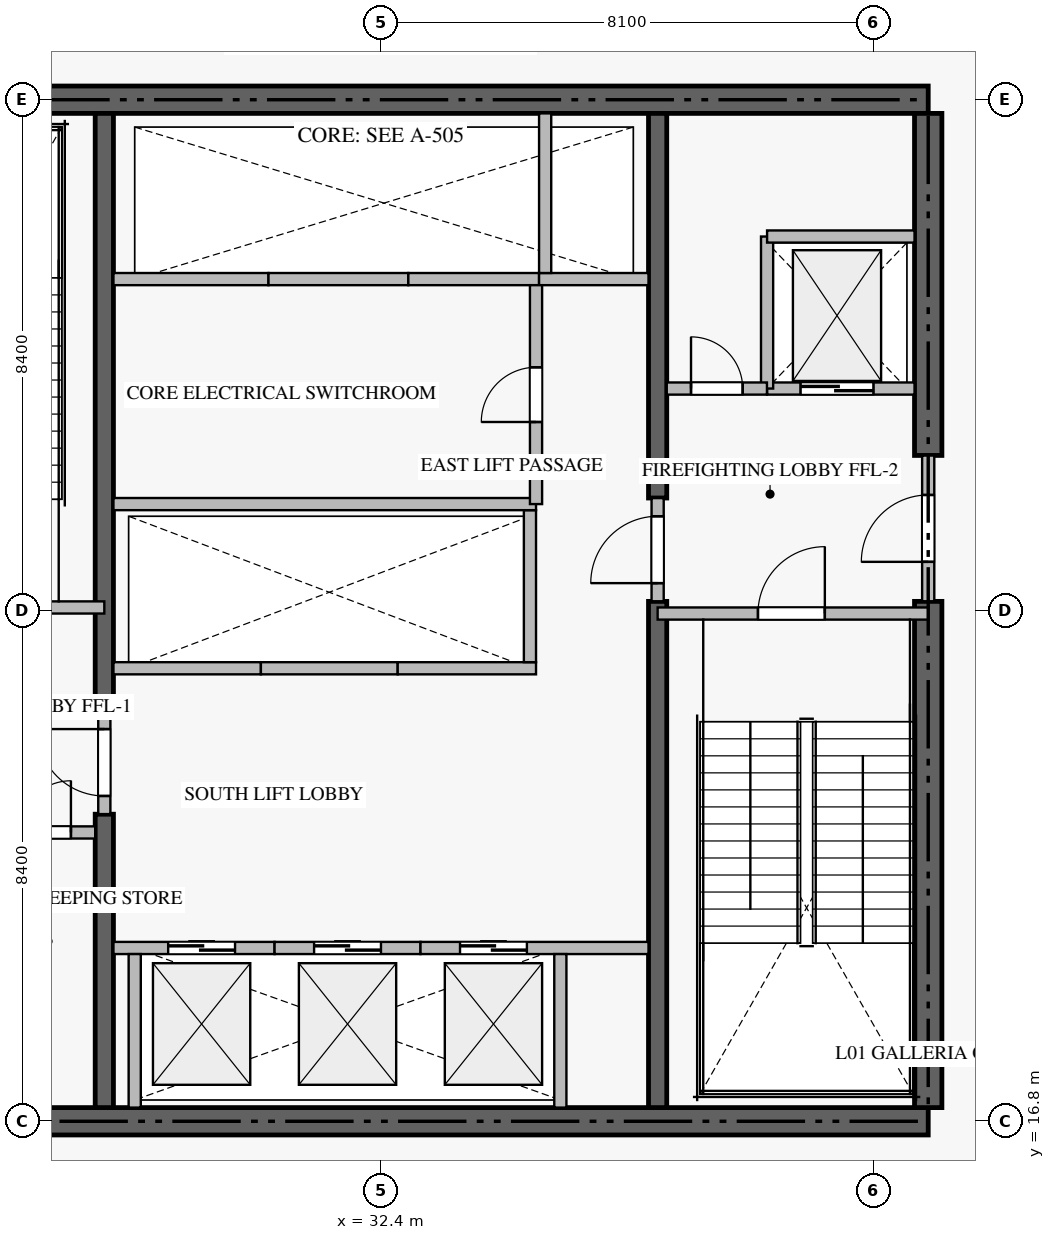
"""IFC4 building model, lengths in metres.
Left out: names, types, materials, properties, quantities, classifications, styles, units other than length and angle.
Written with IfcOpenShell. Run it as: python <this file> out.ifc"""

import sys

from ifc_helpers import new_model, si_unit, direction, frame, frame_2d, origin, place, context, subcontext, project, spatial, rectangle, extrude, source, transform, mapped, element, fill, save


model = new_model("IFC4")
c1 = context("Model", 3, precision=1e-05, world=origin(), true_north=direction((0.0, 1.0)))
c2 = subcontext(c1, "Body", "Model", "MODEL_VIEW")
j1 = project(units=[si_unit("LENGTHUNIT", "METRE"), si_unit("PLANEANGLEUNIT", "RADIAN")], contexts=[c1])
p1 = place(None, origin())
s1 = spatial("IfcSite", under=j1, at=p1, CompositionType="ELEMENT")
p2 = place(p1, origin())
s2 = spatial("IfcBuilding", under=s1, at=p2, CompositionType="ELEMENT")
p3 = place(p2, frame((0.0, 0.0, 5.5)))
s3 = spatial("IfcBuildingStorey", under=s2, at=p3, CompositionType="ELEMENT", Elevation=5.5)
for number, where, z_axis, x_axis in (
    (1, (23.4, 16.8, -0.38), (0.0, 0.0, 1.0), (1.0, 0.0, 0.0)),
    (2, (41.4, 33.6, -0.38), (0.0, 0.0, 1.0), (-1.0, 0.0, 0.0)),
):
    element("IfcWall", number, at=place(p3, frame(where, z_axis=z_axis, x_axis=x_axis)), inside=s3, PredefinedType="SHEAR", context=c2, shape_type="SweptSolid", body=[
        extrude(rectangle(XDim=18.0, YDim=0.45, at=frame_2d((9.0, 0.0))), origin(), (0.0, 0.0, 1.0), 4.998),
    ])
p4 = place(p3, frame((41.4, 17.025, -0.38), z_axis=(0.0, 0.0, 1.0), x_axis=(0.0, 1.0, 0.0)))
e3 = element("IfcWall", 3, at=p4, inside=s3, PredefinedType="SHEAR", context=c2, shape_type="SweptSolid", body=[
    extrude(rectangle(XDim=8.325, YDim=0.45, at=frame_2d((4.163, 0.0))), origin(), (0.0, 0.0, 1.0), 4.998),
])
p5 = place(p3, frame((41.4, 27.75, -0.38), z_axis=(0.0, 0.0, 1.0), x_axis=(0.0, 1.0, 0.0)))
e4 = element("IfcWall", 4, at=p5, inside=s3, PredefinedType="SHEAR", context=c2, shape_type="SweptSolid", body=[
    extrude(rectangle(XDim=5.625, YDim=0.45, at=frame_2d((2.812, 0.0))), origin(), (0.0, 0.0, 1.0), 4.998),
])
p6 = place(p3, frame((27.85, 17.025, -0.38), z_axis=(0.0, 0.0, 1.0), x_axis=(0.0, 1.0, 0.0)))
e5 = element("IfcWall", 5, at=p6, inside=s3, PredefinedType="SHEAR", context=c2, shape_type="SweptSolid", body=[
    extrude(rectangle(XDim=4.825, YDim=0.3, at=frame_2d((2.413, 0.0))), origin(), (0.0, 0.0, 1.0), 4.998),
])
p7 = place(p3, frame((27.85, 23.55, -0.38), z_axis=(0.0, 0.0, 1.0), x_axis=(0.0, 1.0, 0.0)))
e6 = element("IfcWall", 6, at=p7, inside=s3, PredefinedType="SHEAR", context=c2, shape_type="SweptSolid", body=[
    extrude(rectangle(XDim=9.825, YDim=0.3, at=frame_2d((4.913, 0.0))), origin(), (0.0, 0.0, 1.0), 4.998),
])
p8 = place(p3, frame((36.95, 17.025, -0.38), z_axis=(0.0, 0.0, 1.0), x_axis=(0.0, 1.0, 0.0)))
e7 = element("IfcWall", 7, at=p8, inside=s3, PredefinedType="SHEAR", context=c2, shape_type="SweptSolid", body=[
    extrude(rectangle(XDim=8.325, YDim=0.3, at=frame_2d((4.163, 0.0))), origin(), (0.0, 0.0, 1.0), 4.998),
])
p9 = place(p3, frame((36.95, 27.05, -0.38), z_axis=(0.0, 0.0, 1.0), x_axis=(0.0, 1.0, 0.0)))
e8 = element("IfcWall", 8, at=p9, inside=s3, PredefinedType="SHEAR", context=c2, shape_type="SweptSolid", body=[
    extrude(rectangle(XDim=6.325, YDim=0.3, at=frame_2d((3.163, 0.0))), origin(), (0.0, 0.0, 1.0), 4.998),
])
p10 = place(p3, frame((23.4, 25.25, 0.0), z_axis=(0.0, 0.0, 1.0), x_axis=(1.0, 0.0, 0.0)))
e9 = element("IfcWall", 9, at=p10, inside=s3, PredefinedType="STANDARD", context=c2, shape_type="SweptSolid", body=[
    extrude(rectangle(XDim=4.45, YDim=0.2, at=frame_2d((2.225, 0.0))), origin(), (0.0, 0.0, 1.0), 4.62),
])
p11 = place(p10, frame((1.65, 0.0, 0.0)))
e10 = element("IfcOpeningElement", 10, at=p11, cuts=e9, PredefinedType="OPENING", context=c2, shape_type="SweptSolid", body=[
    extrude(rectangle(XDim=1.1, YDim=2.15, at=frame_2d((0.55, 1.075))), frame((0.0, 0.11, 0.0), z_axis=(0.0, -1.0, 0.0), x_axis=(1.0, 0.0, 0.0)), (0.0, 0.0, 1.0), 0.22),
])
p12 = place(p3, frame((36.95, 25.15, 0.0), z_axis=(0.0, 0.0, 1.0), x_axis=(1.0, 0.0, 0.0)))
e11 = element("IfcWall", 11, at=p12, inside=s3, PredefinedType="STANDARD", context=c2, shape_type="SweptSolid", body=[
    extrude(rectangle(XDim=4.45, YDim=0.2, at=frame_2d((2.225, 0.0))), origin(), (0.0, 0.0, 1.0), 4.62),
])
p13 = place(p12, frame((1.65, 0.0, 0.0)))
e12 = element("IfcOpeningElement", 12, at=p13, cuts=e11, PredefinedType="OPENING", context=c2, shape_type="SweptSolid", body=[
    extrude(rectangle(XDim=1.1, YDim=2.15, at=frame_2d((0.55, 1.075))), frame((0.0, 0.11, 0.0), z_axis=(0.0, -1.0, 0.0), x_axis=(1.0, 0.0, 0.0)), (0.0, 0.0, 1.0), 0.22),
])
p14 = place(p3, frame((38.75, 28.85, 0.0), z_axis=(0.0, 0.0, 1.0), x_axis=(1.0, 0.0, 0.0)))
e13 = element("IfcWall", 13, at=p14, inside=s3, PredefinedType="STANDARD", context=c2, shape_type="SweptSolid", body=[
    extrude(rectangle(XDim=2.425, YDim=0.2, at=frame_2d((1.212, 0.0))), origin(), (0.0, 0.0, 1.0), 4.62),
])
p15 = place(p14, frame((0.55, 0.0, 0.0)))
e14 = element("IfcOpeningElement", 14, at=p15, cuts=e13, PredefinedType="OPENING", context=c2, shape_type="SweptSolid", body=[
    extrude(rectangle(XDim=1.2, YDim=2.2, at=frame_2d((0.6, 1.1))), frame((0.0, 0.11, 0.0), z_axis=(0.0, -1.0, 0.0), x_axis=(1.0, 0.0, 0.0)), (0.0, 0.0, 1.0), 0.22),
])
p16 = place(p3, frame((28.0, 19.65, 0.0), z_axis=(0.0, 0.0, 1.0), x_axis=(1.0, 0.0, 0.0)))
e15 = element("IfcWall", 15, at=p16, inside=s3, PredefinedType="STANDARD", context=c2, shape_type="SweptSolid", body=[
    extrude(rectangle(XDim=2.65, YDim=0.2, at=frame_2d((1.325, 0.0))), origin(), (0.0, 0.0, 1.0), 4.62),
])
p17 = place(p16, frame((0.9, 0.0, 0.0)))
e16 = element("IfcOpeningElement", 16, at=p17, cuts=e15, PredefinedType="OPENING", context=c2, shape_type="SweptSolid", body=[
    extrude(rectangle(XDim=1.1, YDim=2.2, at=frame_2d((0.55, 1.1))), frame((0.0, 0.11, 0.0), z_axis=(0.0, -1.0, 0.0), x_axis=(1.0, 0.0, 0.0)), (0.0, 0.0, 1.0), 0.22),
])
p18 = place(p3, frame((28.35, 17.025, 0.0), z_axis=(0.0, 0.0, 1.0), x_axis=(0.0, 1.0, 0.0)))
e17 = element("IfcWall", 17, at=p18, inside=s3, PredefinedType="STANDARD", context=c2, shape_type="SweptSolid", body=[
    extrude(rectangle(XDim=2.525, YDim=0.2, at=frame_2d((1.263, 0.0))), origin(), (0.0, 0.0, 1.0), 4.62),
])
p19 = place(p3, frame((30.65, 19.65, 0.0), z_axis=(0.0, 0.0, 1.0), x_axis=(1.0, 0.0, 0.0)))
e18 = element("IfcWall", 18, at=p19, inside=s3, PredefinedType="STANDARD", context=c2, shape_type="SweptSolid", body=[
    extrude(rectangle(XDim=2.4, YDim=0.2, at=frame_2d((1.2, 0.0))), origin(), (0.0, 0.0, 1.0), 4.62),
])
p20 = place(p19, frame((0.65, 0.0, 0.0)))
e19 = element("IfcOpeningElement", 19, at=p20, cuts=e18, PredefinedType="OPENING", context=c2, shape_type="SweptSolid", body=[
    extrude(rectangle(XDim=1.1, YDim=2.2, at=frame_2d((0.55, 1.1))), frame((0.0, 0.11, 0.0), z_axis=(0.0, -1.0, 0.0), x_axis=(1.0, 0.0, 0.0)), (0.0, 0.0, 1.0), 0.22),
])
p21 = place(p3, frame((33.05, 19.65, 0.0), z_axis=(0.0, 0.0, 1.0), x_axis=(1.0, 0.0, 0.0)))
e20 = element("IfcWall", 20, at=p21, inside=s3, PredefinedType="STANDARD", context=c2, shape_type="SweptSolid", body=[
    extrude(rectangle(XDim=3.75, YDim=0.2, at=frame_2d((1.875, 0.0))), origin(), (0.0, 0.0, 1.0), 4.62),
])
p22 = place(p21, frame((0.65, 0.0, 0.0)))
e21 = element("IfcOpeningElement", 21, at=p22, cuts=e20, PredefinedType="OPENING", context=c2, shape_type="SweptSolid", body=[
    extrude(rectangle(XDim=1.1, YDim=2.2, at=frame_2d((0.55, 1.1))), frame((0.0, 0.11, 0.0), z_axis=(0.0, -1.0, 0.0), x_axis=(1.0, 0.0, 0.0)), (0.0, 0.0, 1.0), 0.22),
])
p23 = place(p3, frame((35.35, 17.025, 0.0), z_axis=(0.0, 0.0, 1.0), x_axis=(0.0, 1.0, 0.0)))
e22 = element("IfcWall", 22, at=p23, inside=s3, PredefinedType="STANDARD", context=c2, shape_type="SweptSolid", body=[
    extrude(rectangle(XDim=2.525, YDim=0.2, at=frame_2d((1.263, 0.0))), origin(), (0.0, 0.0, 1.0), 4.62),
])
p24 = place(p3, frame((28.0, 24.25, 0.0), z_axis=(0.0, 0.0, 1.0), x_axis=(1.0, 0.0, 0.0)))
e23 = element("IfcWall", 23, at=p24, inside=s3, PredefinedType="STANDARD", context=c2, shape_type="SweptSolid", body=[
    extrude(rectangle(XDim=2.425, YDim=0.2, at=frame_2d((1.212, 0.0))), origin(), (0.0, 0.0, 1.0), 4.62),
])
p25 = place(p3, frame((30.425, 24.25, 0.0), z_axis=(0.0, 0.0, 1.0), x_axis=(1.0, 0.0, 0.0)))
e24 = element("IfcWall", 24, at=p25, inside=s3, PredefinedType="STANDARD", context=c2, shape_type="SweptSolid", body=[
    extrude(rectangle(XDim=2.25, YDim=0.2, at=frame_2d((1.125, 0.0))), origin(), (0.0, 0.0, 1.0), 4.62),
])
p26 = place(p3, frame((32.675, 24.25, 0.0), z_axis=(0.0, 0.0, 1.0), x_axis=(1.0, 0.0, 0.0)))
e25 = element("IfcWall", 25, at=p26, inside=s3, PredefinedType="STANDARD", context=c2, shape_type="SweptSolid", body=[
    extrude(rectangle(XDim=2.275, YDim=0.2, at=frame_2d((1.137, 0.0))), origin(), (0.0, 0.0, 1.0), 4.62),
])
p27 = place(p3, frame((34.85, 24.35, 0.0), z_axis=(0.0, 0.0, 1.0), x_axis=(0.0, 1.0, 0.0)))
e26 = element("IfcWall", 26, at=p27, inside=s3, PredefinedType="STANDARD", context=c2, shape_type="SweptSolid", body=[
    extrude(rectangle(XDim=2.5, YDim=0.2, at=frame_2d((1.25, 0.0))), origin(), (0.0, 0.0, 1.0), 4.62),
])
p28 = place(p3, frame((28.0, 30.65, 0.0), z_axis=(0.0, 0.0, 1.0), x_axis=(1.0, 0.0, 0.0)))
e27 = element("IfcWall", 27, at=p28, inside=s3, PredefinedType="STANDARD", context=c2, shape_type="SweptSolid", body=[
    extrude(rectangle(XDim=2.55, YDim=0.2, at=frame_2d((1.275, 0.0))), origin(), (0.0, 0.0, 1.0), 4.62),
])
p29 = place(p3, frame((30.55, 30.65, 0.0), z_axis=(0.0, 0.0, 1.0), x_axis=(1.0, 0.0, 0.0)))
e28 = element("IfcWall", 28, at=p29, inside=s3, PredefinedType="STANDARD", context=c2, shape_type="SweptSolid", body=[
    extrude(rectangle(XDim=2.3, YDim=0.2, at=frame_2d((1.15, 0.0))), origin(), (0.0, 0.0, 1.0), 4.62),
])
p30 = place(p3, frame((32.85, 30.65, 0.0), z_axis=(0.0, 0.0, 1.0), x_axis=(1.0, 0.0, 0.0)))
e29 = element("IfcWall", 29, at=p30, inside=s3, PredefinedType="STANDARD", context=c2, shape_type="SweptSolid", body=[
    extrude(rectangle(XDim=2.15, YDim=0.2, at=frame_2d((1.075, 0.0))), origin(), (0.0, 0.0, 1.0), 4.62),
])
p31 = place(p3, frame((35.0, 30.65, 0.0), z_axis=(0.0, 0.0, 1.0), x_axis=(1.0, 0.0, 0.0)))
e30 = element("IfcWall", 30, at=p31, inside=s3, PredefinedType="STANDARD", context=c2, shape_type="SweptSolid", body=[
    extrude(rectangle(XDim=1.8, YDim=0.2, at=frame_2d((0.9, 0.0))), origin(), (0.0, 0.0, 1.0), 4.62),
])
p32 = place(p3, frame((35.1, 30.75, 0.0), z_axis=(0.0, 0.0, 1.0), x_axis=(0.0, 1.0, 0.0)))
e31 = element("IfcWall", 31, at=p32, inside=s3, PredefinedType="STANDARD", context=c2, shape_type="SweptSolid", body=[
    extrude(rectangle(XDim=2.625, YDim=0.2, at=frame_2d((1.312, 0.0))), origin(), (0.0, 0.0, 1.0), 4.62),
])
p33 = place(p3, frame((26.052, 21.55, 0.0), z_axis=(0.0, 0.0, 1.0), x_axis=(1.0, 0.0, 0.0)))
e32 = element("IfcWall", 32, at=p33, inside=s3, PredefinedType="STANDARD", context=c2, shape_type="SweptSolid", body=[
    extrude(rectangle(XDim=1.648, YDim=0.2, at=frame_2d((0.824, 0.0))), origin(), (0.0, 0.0, 1.0), 4.62),
])
p34 = place(p33, frame((0.399, 0.0, 0.0)))
e33 = element("IfcOpeningElement", 33, at=p34, cuts=e32, PredefinedType="OPENING", context=c2, shape_type="SweptSolid", body=[
    extrude(rectangle(XDim=0.85, YDim=2.1, at=frame_2d((0.425, 1.05))), frame((0.0, 0.11, 0.0), z_axis=(0.0, -1.0, 0.0), x_axis=(1.0, 0.0, 0.0)), (0.0, 0.0, 1.0), 0.22),
])
p35 = place(p3, frame((38.75, 28.85, 0.0), z_axis=(0.0, 0.0, 1.0), x_axis=(0.0, 1.0, 0.0)))
e34 = element("IfcWall", 34, at=p35, inside=s3, PredefinedType="STANDARD", context=c2, shape_type="SweptSolid", body=[
    extrude(rectangle(XDim=2.5, YDim=0.2, at=frame_2d((1.25, 0.0))), origin(), (0.0, 0.0, 1.0), 4.62),
])
p36 = place(p3, frame((38.75, 31.35, 0.0), z_axis=(0.0, 0.0, 1.0), x_axis=(1.0, 0.0, 0.0)))
e35 = element("IfcWall", 35, at=p36, inside=s3, PredefinedType="STANDARD", context=c2, shape_type="SweptSolid", body=[
    extrude(rectangle(XDim=2.425, YDim=0.2, at=frame_2d((1.212, 0.0))), origin(), (0.0, 0.0, 1.0), 4.62),
])
p37 = place(p3, frame((37.1, 28.85, 0.0), z_axis=(0.0, 0.0, 1.0), x_axis=(1.0, 0.0, 0.0)))
e36 = element("IfcWall", 36, at=p37, inside=s3, PredefinedType="STANDARD", context=c2, shape_type="SweptSolid", body=[
    extrude(rectangle(XDim=1.648, YDim=0.2, at=frame_2d((0.824, 0.0))), origin(), (0.0, 0.0, 1.0), 4.62),
])
p38 = place(p37, frame((0.399, 0.0, 0.0)))
e37 = element("IfcOpeningElement", 37, at=p38, cuts=e36, PredefinedType="OPENING", context=c2, shape_type="SweptSolid", body=[
    extrude(rectangle(XDim=0.85, YDim=2.1, at=frame_2d((0.425, 1.05))), frame((0.0, 0.11, 0.0), z_axis=(0.0, -1.0, 0.0), x_axis=(1.0, 0.0, 0.0)), (0.0, 0.0, 1.0), 0.22),
])
p39 = place(p3, frame((41.4, 25.352, 0.0), z_axis=(0.0, 0.0, 1.0), x_axis=(0.0, 1.0, 0.0)))
e38 = element("IfcWall", 38, at=p39, inside=s3, PredefinedType="STANDARD", context=c2, shape_type="SweptSolid", body=[
    extrude(rectangle(XDim=2.396, YDim=0.2, at=frame_2d((1.198, 0.0))), origin(), (0.0, 0.0, 1.0), 4.62),
])
p40 = place(p39, frame((0.648, 0.0, 0.0)))
e39 = element("IfcOpeningElement", 39, at=p40, cuts=e38, PredefinedType="OPENING", context=c2, shape_type="SweptSolid", body=[
    extrude(rectangle(XDim=1.1, YDim=2.15, at=frame_2d((0.55, 1.075))), frame((0.0, 0.11, 0.0), z_axis=(0.0, -1.0, 0.0), x_axis=(1.0, 0.0, 0.0)), (0.0, 0.0, 1.0), 0.22),
])
p41 = place(p3, frame((27.85, 21.852, 0.0), z_axis=(0.0, 0.0, 1.0), x_axis=(0.0, 1.0, 0.0)))
e40 = element("IfcWall", 40, at=p41, inside=s3, PredefinedType="STANDARD", context=c2, shape_type="SweptSolid", body=[
    extrude(rectangle(XDim=1.696, YDim=0.2, at=frame_2d((0.848, 0.0))), origin(), (0.0, 0.0, 1.0), 4.62),
])
p42 = place(p41, frame((0.298, 0.0, 0.0)))
e41 = element("IfcOpeningElement", 41, at=p42, cuts=e40, PredefinedType="OPENING", context=c2, shape_type="SweptSolid", body=[
    extrude(rectangle(XDim=1.1, YDim=2.15, at=frame_2d((0.55, 1.075))), frame((0.0, 0.11, 0.0), z_axis=(0.0, -1.0, 0.0), x_axis=(1.0, 0.0, 0.0)), (0.0, 0.0, 1.0), 0.22),
])
p43 = place(p3, frame((36.95, 25.352, 0.0), z_axis=(0.0, 0.0, 1.0), x_axis=(0.0, 1.0, 0.0)))
e42 = element("IfcWall", 42, at=p43, inside=s3, PredefinedType="STANDARD", context=c2, shape_type="SweptSolid", body=[
    extrude(rectangle(XDim=1.696, YDim=0.2, at=frame_2d((0.848, 0.0))), origin(), (0.0, 0.0, 1.0), 4.62),
])
p44 = place(p43, frame((0.298, 0.0, 0.0)))
e43 = element("IfcOpeningElement", 43, at=p44, cuts=e42, PredefinedType="OPENING", context=c2, shape_type="SweptSolid", body=[
    extrude(rectangle(XDim=1.1, YDim=2.15, at=frame_2d((0.55, 1.075))), frame((0.0, 0.11, 0.0), z_axis=(0.0, -1.0, 0.0), x_axis=(1.0, 0.0, 0.0)), (0.0, 0.0, 1.0), 0.22),
])
p45 = place(p3, frame((28.0, 26.95, 0.0), z_axis=(0.0, 0.0, 1.0), x_axis=(1.0, 0.0, 0.0)))
e44 = element("IfcWall", 44, at=p45, inside=s3, PredefinedType="STANDARD", context=c2, shape_type="SweptSolid", body=[
    extrude(rectangle(XDim=6.95, YDim=0.2, at=frame_2d((3.475, 0.0))), origin(), (0.0, 0.0, 1.0), 4.62),
])
p46 = place(p3, frame((34.95, 26.95, 0.0), z_axis=(0.0, 0.0, 1.0), x_axis=(0.0, 1.0, 0.0)))
e45 = element("IfcWall", 45, at=p46, inside=s3, PredefinedType="STANDARD", context=c2, shape_type="SweptSolid", body=[
    extrude(rectangle(XDim=3.6, YDim=0.2, at=frame_2d((1.8, 0.0))), origin(), (0.0, 0.0, 1.0), 4.62),
])
p47 = place(p46, frame((1.35, 0.0, 0.0)))
e46 = element("IfcOpeningElement", 46, at=p47, cuts=e45, PredefinedType="OPENING", context=c2, shape_type="SweptSolid", body=[
    extrude(rectangle(XDim=0.9, YDim=2.1, at=frame_2d((0.45, 1.05))), frame((0.0, 0.11, 0.0), z_axis=(0.0, -1.0, 0.0), x_axis=(1.0, 0.0, 0.0)), (0.0, 0.0, 1.0), 0.22),
])
m1 = source(origin(), c2, "Body", "SweptSolid", [
    extrude(rectangle(XDim=1.1, YDim=2.15, at=frame_2d((0.55, 1.075))), frame((0.0, 0.025, 0.0), z_axis=(0.0, -1.0, 0.0), x_axis=(1.0, 0.0, 0.0)), (0.0, 0.0, 1.0), 0.05),
])
p48 = place(p13, origin())
e47 = element("IfcDoor", 47, at=p48, inside=s3, OperationType="SINGLE_SWING_RIGHT", PredefinedType="DOOR", context=c2, shape_type="MappedRepresentation", body=[
    mapped(m1, transform((0.0, 0.0, 0.0), scale=1.0)),
])
fill(e12, e47)
m2 = source(origin(), c2, "Body", "SweptSolid", [
    extrude(rectangle(XDim=1.2, YDim=2.2, at=frame_2d((0.6, 1.1))), frame((0.0, 0.025, 0.0), z_axis=(0.0, -1.0, 0.0), x_axis=(1.0, 0.0, 0.0)), (0.0, 0.0, 1.0), 0.05),
])
p49 = place(p15, origin())
e48 = element("IfcDoor", 48, at=p49, inside=s3, OperationType="DOUBLE_DOOR_SLIDING", PredefinedType="DOOR", context=c2, shape_type="MappedRepresentation", body=[
    mapped(m2, transform((0.0, 0.0, 0.0), scale=1.0)),
])
fill(e14, e48)
m3 = source(origin(), c2, "Body", "SweptSolid", [
    extrude(rectangle(XDim=1.1, YDim=2.2, at=frame_2d((0.55, 1.1))), frame((0.0, 0.025, 0.0), z_axis=(0.0, -1.0, 0.0), x_axis=(1.0, 0.0, 0.0)), (0.0, 0.0, 1.0), 0.05),
])
p50 = place(p17, origin())
e49 = element("IfcDoor", 49, at=p50, inside=s3, OperationType="DOUBLE_DOOR_SLIDING", PredefinedType="DOOR", context=c2, shape_type="MappedRepresentation", body=[
    mapped(m3, transform((0.0, 0.0, 0.0), scale=1.0)),
])
fill(e16, e49)
p51 = place(p20, origin())
e50 = element("IfcDoor", 50, at=p51, inside=s3, OperationType="DOUBLE_DOOR_SLIDING", PredefinedType="DOOR", context=c2, shape_type="MappedRepresentation", body=[
    mapped(m3, transform((0.0, 0.0, 0.0), scale=1.0)),
])
fill(e19, e50)
p52 = place(p22, origin())
e51 = element("IfcDoor", 51, at=p52, inside=s3, OperationType="DOUBLE_DOOR_SLIDING", PredefinedType="DOOR", context=c2, shape_type="MappedRepresentation", body=[
    mapped(m3, transform((0.0, 0.0, 0.0), scale=1.0)),
])
fill(e21, e51)
m4 = source(origin(), c2, "Body", "SweptSolid", [
    extrude(rectangle(XDim=0.85, YDim=2.1, at=frame_2d((0.425, 1.05))), frame((0.0, 0.025, 0.0), z_axis=(0.0, -1.0, 0.0), x_axis=(1.0, 0.0, 0.0)), (0.0, 0.0, 1.0), 0.05),
])
p53 = place(p34, origin())
e52 = element("IfcDoor", 52, at=p53, inside=s3, OperationType="SINGLE_SWING_RIGHT", PredefinedType="DOOR", context=c2, shape_type="MappedRepresentation", body=[
    mapped(m4, transform((0.0, 0.0, 0.0), scale=1.0)),
])
fill(e33, e52)
p54 = place(p38, origin())
e53 = element("IfcDoor", 53, at=p54, inside=s3, OperationType="SINGLE_SWING_LEFT", PredefinedType="DOOR", context=c2, shape_type="MappedRepresentation", body=[
    mapped(m4, transform((0.0, 0.0, 0.0), scale=1.0)),
])
fill(e37, e53)
p55 = place(p40, origin())
e54 = element("IfcDoor", 54, at=p55, inside=s3, OperationType="SINGLE_SWING_LEFT", PredefinedType="DOOR", context=c2, shape_type="MappedRepresentation", body=[
    mapped(m1, transform((0.0, 0.0, 0.0), scale=1.0)),
])
fill(e39, e54)
p56 = place(p42, origin())
e55 = element("IfcDoor", 55, at=p56, inside=s3, OperationType="SINGLE_SWING_RIGHT", PredefinedType="DOOR", context=c2, shape_type="MappedRepresentation", body=[
    mapped(m1, transform((0.0, 0.0, 0.0), scale=1.0)),
])
fill(e41, e55)
p57 = place(p44, origin())
e56 = element("IfcDoor", 56, at=p57, inside=s3, OperationType="SINGLE_SWING_LEFT", PredefinedType="DOOR", context=c2, shape_type="MappedRepresentation", body=[
    mapped(m1, transform((0.0, 0.0, 0.0), scale=1.0)),
])
fill(e43, e56)
m5 = source(origin(), c2, "Body", "SweptSolid", [
    extrude(rectangle(XDim=0.9, YDim=2.1, at=frame_2d((0.45, 1.05))), frame((0.0, 0.025, 0.0), z_axis=(0.0, -1.0, 0.0), x_axis=(1.0, 0.0, 0.0)), (0.0, 0.0, 1.0), 0.05),
])
p58 = place(p47, origin())
e57 = element("IfcDoor", 57, at=p58, inside=s3, OperationType="SINGLE_SWING_LEFT", PredefinedType="DOOR", context=c2, shape_type="MappedRepresentation", body=[
    mapped(m5, transform((0.0, 0.0, 0.0), scale=1.0)),
])
fill(e46, e57)
save(model, sys.argv[1])
